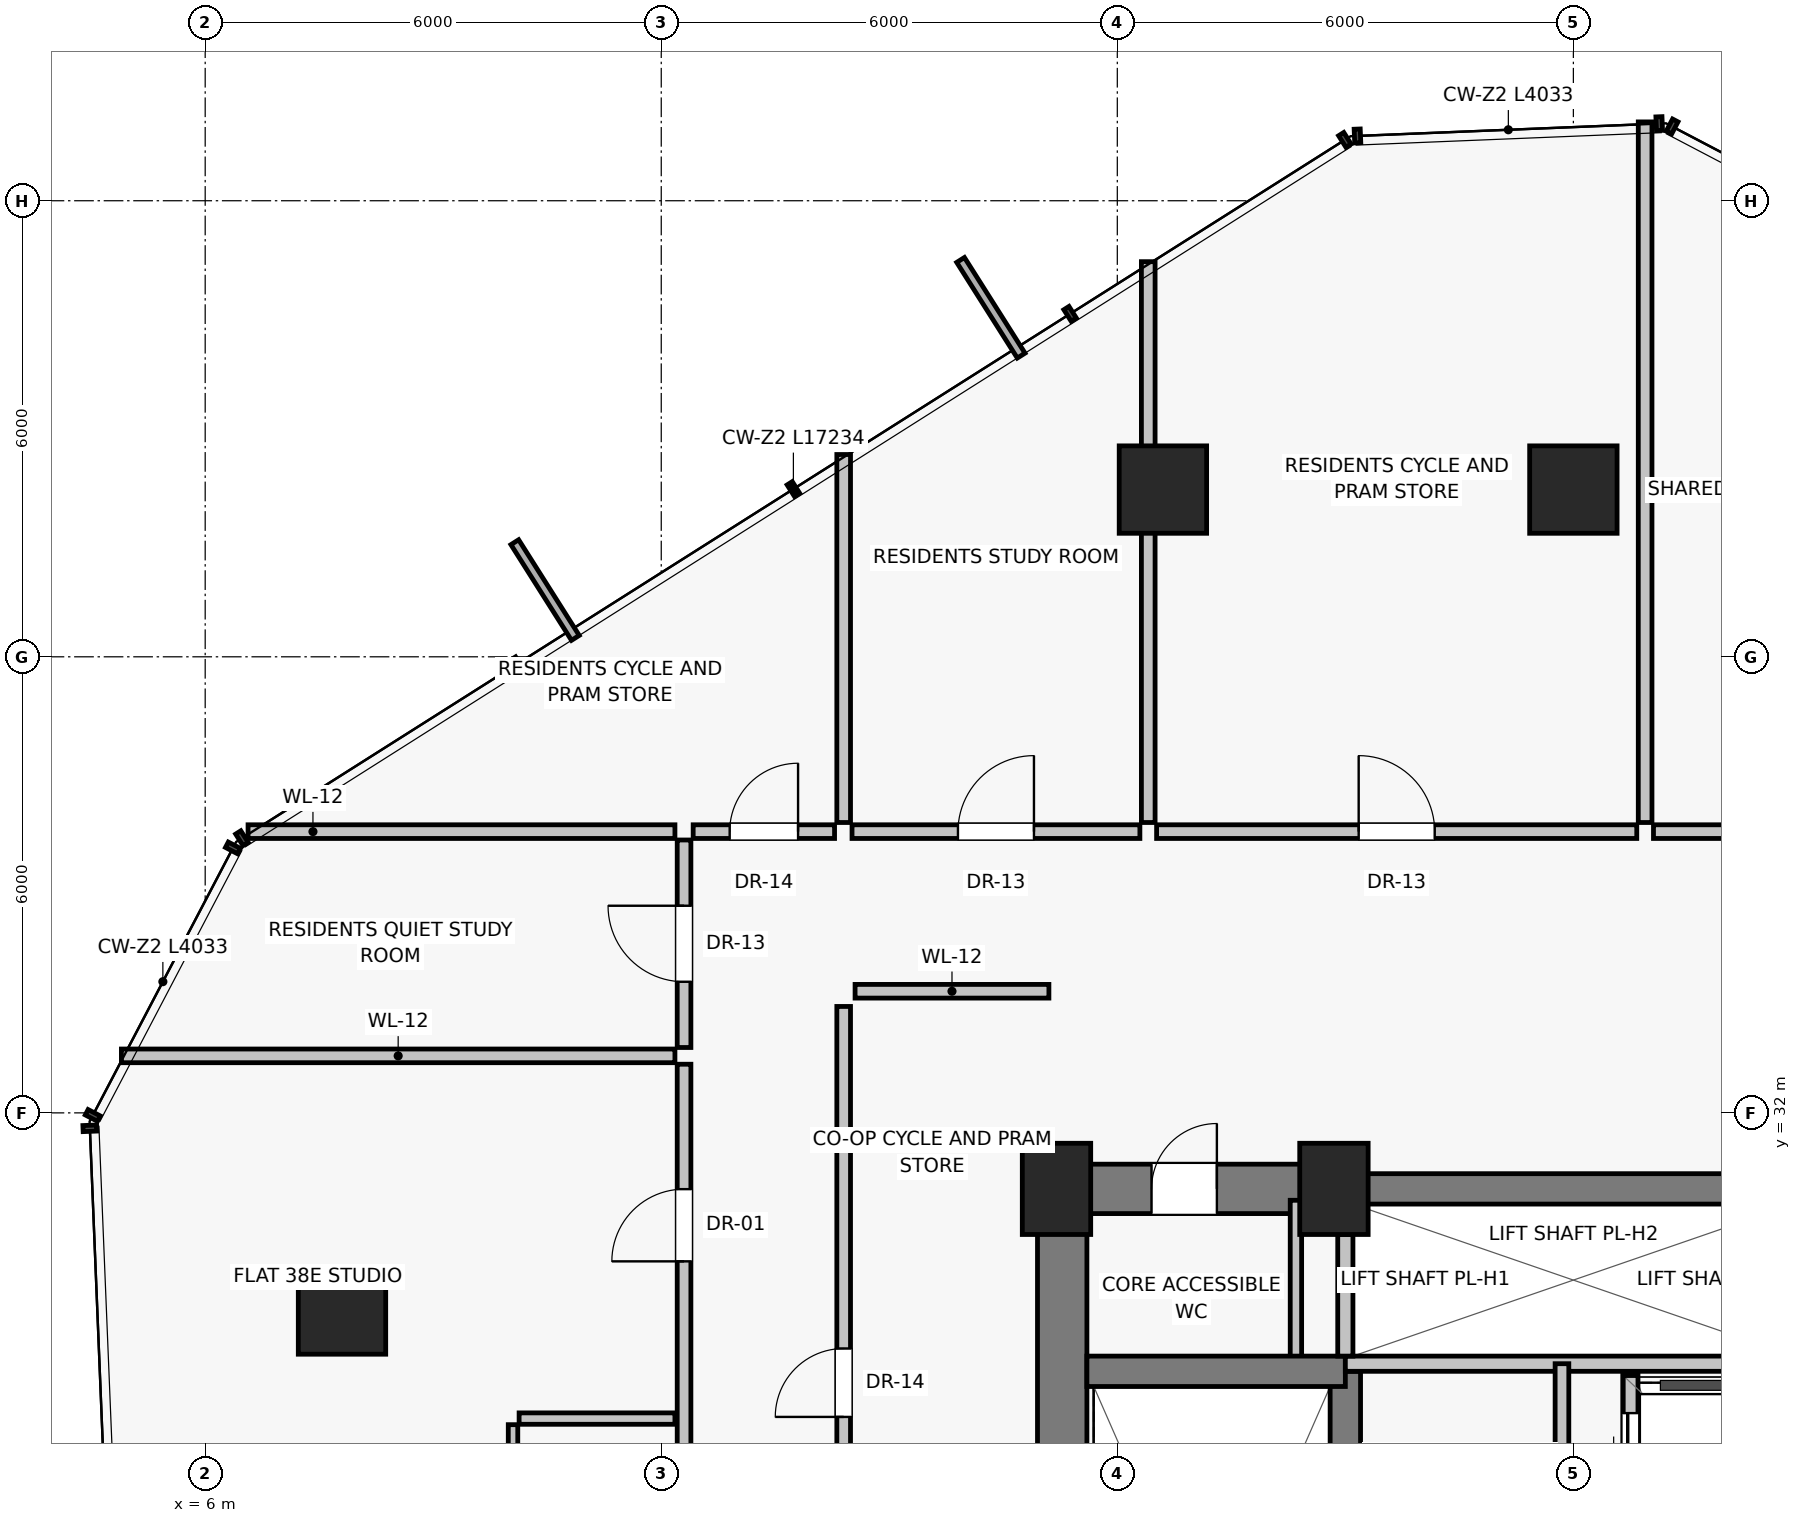
"""IFC4 building model, lengths in metres.
Left out: names, types, materials, properties, quantities, classifications, styles, units other than length and angle.
Written with IfcOpenShell. Run it as: python <this file> out.ifc"""

import sys

from ifc_helpers import new_model, si_unit, direction, frame, frame_2d, origin, origin_2d, place, context, subcontext, project, spatial, rectangle, extrude, source, transform, mapped, element, fill, save


model = new_model("IFC4")
c1 = context("Model", 3, precision=1e-05, world=origin(), true_north=direction((0.0, 1.0)))
c2 = subcontext(c1, "Body", "Model", "MODEL_VIEW")
j1 = project(units=[si_unit("LENGTHUNIT", "METRE"), si_unit("PLANEANGLEUNIT", "RADIAN")], contexts=[c1])
p1 = place(None, origin())
s1 = spatial("IfcSite", under=j1, at=p1, CompositionType="ELEMENT")
p2 = place(p1, origin())
s2 = spatial("IfcBuilding", under=s1, at=p2, CompositionType="ELEMENT")
p3 = place(p2, frame((0.0, 0.0, 136.0)))
s3 = spatial("IfcBuildingStorey", under=s2, at=p3, CompositionType="ELEMENT", Elevation=136.0)
for number, where, z_axis, x_axis in (
    (1, (17.2, 31.0, 0.0), (0.0, 0.0, 1.0), (1.0, 0.0, 0.0)),
    (2, (20.85, 31.0, 0.0), (0.0, 0.0, 1.0), (1.0, 0.0, 0.0)),
):
    element("IfcColumn", number, at=place(p3, frame(where, z_axis=z_axis, x_axis=x_axis)), inside=s3, PredefinedType="PILASTER", context=c2, shape_type="SweptSolid", body=[
        extrude(rectangle(XDim=0.9, YDim=1.2, at=origin_2d()), origin(), (0.0, 0.0, 1.0), 3.25),
    ])
for number, where, z_axis, x_axis in (
    (3, (24.0, 40.2, 0.0), (0.0, 0.0, 1.0), (1.0, 0.0, 0.0)),
    (4, (18.6, 40.2, 0.0), (0.0, 0.0, 1.0), (1.0, 0.0, 0.0)),
    (5, (7.8, 29.4, 0.0), (0.0, 0.0, 1.0), (1.0, 0.0, 0.0)),
):
    element("IfcColumn", number, at=place(p3, frame(where, z_axis=z_axis, x_axis=x_axis)), inside=s3, PredefinedType="COLUMN", context=c2, shape_type="SweptSolid", body=[
        extrude(rectangle(XDim=1.15, YDim=1.15, at=origin_2d()), origin(), (0.0, 0.0, 1.0), 3.25),
    ])
p4 = place(p3, frame((17.275, 16.8, 0.0), z_axis=(0.0, 0.0, 1.0), x_axis=(0.0, 1.0, 0.0)))
e6 = element("IfcWall", 6, at=p4, inside=s3, PredefinedType="SHEAR", context=c2, shape_type="SweptSolid", body=[
    extrude(rectangle(XDim=14.2, YDim=0.65, at=frame_2d((7.1, 0.0))), origin(), (0.0, 0.0, 1.0), 3.0),
])
p5 = place(p3, frame((17.2, 31.0, 0.0), z_axis=(0.0, 0.0, 1.0), x_axis=(1.0, 0.0, 0.0)))
e7 = element("IfcWall", 7, at=p5, inside=s3, PredefinedType="SHEAR", context=c2, shape_type="SweptSolid", body=[
    extrude(rectangle(XDim=3.8, YDim=0.65, at=frame_2d((1.9, 0.0))), origin(), (0.0, 0.0, 1.0), 3.0),
])
p6 = place(p5, frame((1.25, 0.0, 0.0)))
e8 = element("IfcOpeningElement", 8, at=p6, cuts=e7, PredefinedType="OPENING", context=c2, shape_type="SweptSolid", body=[
    extrude(rectangle(XDim=0.86, YDim=2.01, at=frame_2d((0.43, 1.005))), frame((0.0, 0.335, 0.0), z_axis=(0.0, -1.0, 0.0), x_axis=(1.0, 0.0, 0.0)), (0.0, 0.0, 1.0), 0.67),
])
p7 = place(p3, frame((21.0, 31.0, 0.0), z_axis=(0.0, 0.0, 1.0), x_axis=(1.0, 0.0, 0.0)))
e9 = element("IfcWall", 9, at=p7, inside=s3, PredefinedType="SHEAR", context=c2, shape_type="SweptSolid", body=[
    extrude(rectangle(XDim=6.0, YDim=0.4, at=frame_2d((3.0, 0.0))), origin(), (0.0, 0.0, 1.0), 3.0),
])
p8 = place(p3, frame((20.35, 28.65, 0.0), z_axis=(0.0, 0.0, 1.0), x_axis=(0.0, 1.0, 0.0)))
e10 = element("IfcWall", 10, at=p8, inside=s3, PredefinedType="PARTITIONING", context=c2, shape_type="SweptSolid", body=[
    extrude(rectangle(XDim=2.2, YDim=0.15, at=frame_2d((1.1, 0.0))), origin(), (0.0, 0.0, 1.0), 3.0),
])
p9 = place(p3, frame((21.0, 19.8, 0.0), z_axis=(0.0, 0.0, 1.0), x_axis=(0.0, 1.0, 0.0)))
e11 = element("IfcWall", 11, at=p9, inside=s3, PredefinedType="SHEAR", context=c2, shape_type="SweptSolid", body=[
    extrude(rectangle(XDim=8.8, YDim=0.4, at=frame_2d((4.4, 0.0))), origin(), (0.0, 0.0, 1.0), 3.0),
])
p10 = place(p3, frame((17.6, 28.6, 0.0), z_axis=(0.0, 0.0, 1.0), x_axis=(1.0, 0.0, 0.0)))
e12 = element("IfcWall", 12, at=p10, inside=s3, PredefinedType="SHEAR", context=c2, shape_type="SweptSolid", body=[
    extrude(rectangle(XDim=3.4, YDim=0.4, at=frame_2d((1.7, 0.0))), origin(), (0.0, 0.0, 1.0), 3.0),
])
p11 = place(p3, frame((21.0, 28.7, 0.0), z_axis=(0.0, 0.0, 1.0), x_axis=(1.0, 0.0, 0.0)))
e13 = element("IfcWall", 13, at=p11, inside=s3, PredefinedType="SOLIDWALL", context=c2, shape_type="SweptSolid", body=[
    extrude(rectangle(XDim=6.0, YDim=0.2, at=frame_2d((3.0, 0.0))), origin(), (0.0, 0.0, 1.0), 3.0),
])
p12 = place(p3, frame((21.0, 28.8, 0.0), z_axis=(0.0, 0.0, 1.0), x_axis=(0.0, 1.0, 0.0)))
e14 = element("IfcWall", 14, at=p12, inside=s3, PredefinedType="SOLIDWALL", context=c2, shape_type="SweptSolid", body=[
    extrude(rectangle(XDim=1.6, YDim=0.2, at=frame_2d((0.8, 0.0))), origin(), (0.0, 0.0, 1.0), 3.0),
])
p13 = place(p3, frame((23.85, 22.6, 0.0), z_axis=(0.0, 0.0, 1.0), x_axis=(0.0, 1.0, 0.0)))
e15 = element("IfcWall", 15, at=p13, inside=s3, PredefinedType="PARTITIONING", context=c2, shape_type="SweptSolid", body=[
    extrude(rectangle(XDim=6.1, YDim=0.18, at=frame_2d((3.05, 0.0))), origin(), (0.0, 0.0, 1.0), 3.0),
])
p14 = place(p13, frame((2.4, 0.0, 0.0)))
e16 = element("IfcOpeningElement", 16, at=p14, cuts=e15, PredefinedType="OPENING", context=c2, shape_type="SweptSolid", body=[
    extrude(rectangle(XDim=0.9, YDim=2.01, at=frame_2d((0.45, 1.005))), frame((0.0, 0.1, 0.0), z_axis=(0.0, -1.0, 0.0), x_axis=(1.0, 0.0, 0.0)), (0.0, 0.0, 1.0), 0.2),
])
p15 = place(p3, frame((24.75, 22.6, 0.0), z_axis=(0.0, 0.0, 1.0), x_axis=(0.0, 1.0, 0.0)))
e17 = element("IfcWall", 17, at=p15, inside=s3, PredefinedType="SOLIDWALL", context=c2, shape_type="SweptSolid", body=[
    extrude(rectangle(XDim=5.95, YDim=0.2, at=frame_2d((2.975, 0.0))), origin(), (0.0, 0.0, 1.0), 3.0),
])
p16 = place(p15, frame((0.45, 0.0, 0.0)))
e18 = element("IfcOpeningElement", 18, at=p16, cuts=e17, PredefinedType="OPENING", context=c2, shape_type="SweptSolid", body=[
    extrude(rectangle(XDim=1.1, YDim=2.08, at=frame_2d((0.55, 1.04))), frame((0.0, 0.11, 0.0), z_axis=(0.0, -1.0, 0.0), x_axis=(1.0, 0.0, 0.0)), (0.0, 0.0, 1.0), 0.22),
])
p17 = place(p15, frame((2.4, 0.0, 0.0)))
e19 = element("IfcOpeningElement", 19, at=p17, cuts=e17, PredefinedType="OPENING", context=c2, shape_type="SweptSolid", body=[
    extrude(rectangle(XDim=1.1, YDim=2.08, at=frame_2d((0.55, 1.04))), frame((0.0, 0.11, 0.0), z_axis=(0.0, -1.0, 0.0), x_axis=(1.0, 0.0, 0.0)), (0.0, 0.0, 1.0), 0.22),
])
p18 = place(p15, frame((4.35, 0.0, 0.0)))
e20 = element("IfcOpeningElement", 20, at=p18, cuts=e17, PredefinedType="OPENING", context=c2, shape_type="SweptSolid", body=[
    extrude(rectangle(XDim=1.1, YDim=2.08, at=frame_2d((0.55, 1.04))), frame((0.0, 0.11, 0.0), z_axis=(0.0, -1.0, 0.0), x_axis=(1.0, 0.0, 0.0)), (0.0, 0.0, 1.0), 0.22),
])
p19 = place(p3, frame((14.4, 24.2, 0.0), z_axis=(0.0, 0.0, 1.0), x_axis=(0.0, 1.0, 0.0)))
e21 = element("IfcWall", 21, at=p19, inside=s3, PredefinedType="PARTITIONING", context=c2, shape_type="SweptSolid", body=[
    extrude(rectangle(XDim=9.2, YDim=0.18, at=frame_2d((4.6, 0.0))), origin(), (0.0, 0.0, 1.0), 3.0),
])
p20 = place(p19, frame((3.8, 0.0, 0.0)))
e22 = element("IfcOpeningElement", 22, at=p20, cuts=e21, PredefinedType="OPENING", context=c2, shape_type="SweptSolid", body=[
    extrude(rectangle(XDim=0.9, YDim=2.01, at=frame_2d((0.45, 1.005))), frame((0.0, 0.1, 0.0), z_axis=(0.0, -1.0, 0.0), x_axis=(1.0, 0.0, 0.0)), (0.0, 0.0, 1.0), 0.2),
])
p21 = place(p3, frame((14.55, 33.6, 0.0), z_axis=(0.0, 0.0, 1.0), x_axis=(1.0, 0.0, 0.0)))
e23 = element("IfcWall", 23, at=p21, inside=s3, PredefinedType="PARTITIONING", context=c2, shape_type="SweptSolid", body=[
    extrude(rectangle(XDim=2.55, YDim=0.18, at=frame_2d((1.275, 0.0))), origin(), (0.0, 0.0, 1.0), 3.0),
])
p22 = place(p3, frame((14.4, 35.82, 0.0), z_axis=(0.0, 0.0, 1.0), x_axis=(0.0, 1.0, 0.0)))
e24 = element("IfcWall", 24, at=p22, inside=s3, PredefinedType="PARTITIONING", context=c2, shape_type="SweptSolid", body=[
    extrude(rectangle(XDim=4.841, YDim=0.18, at=frame_2d((2.421, 0.0))), origin(), (0.0, 0.0, 1.0), 3.0),
])
p23 = place(p3, frame((14.51, 35.7, 0.0), z_axis=(0.0, 0.0, 1.0), x_axis=(1.0, 0.0, 0.0)))
e25 = element("IfcWall", 25, at=p23, inside=s3, PredefinedType="PARTITIONING", context=c2, shape_type="SweptSolid", body=[
    extrude(rectangle(XDim=3.787, YDim=0.18, at=frame_2d((1.894, 0.0))), origin(), (0.0, 0.0, 1.0), 2.58),
])
p24 = place(p23, frame((1.394, 0.0, 0.0)))
e26 = element("IfcOpeningElement", 26, at=p24, cuts=e25, PredefinedType="OPENING", context=c2, shape_type="SweptSolid", body=[
    extrude(rectangle(XDim=1.0, YDim=2.01, at=frame_2d((0.5, 1.005))), frame((0.0, 0.1, 0.0), z_axis=(0.0, -1.0, 0.0), x_axis=(1.0, 0.0, 0.0)), (0.0, 0.0, 1.0), 0.2),
])
p25 = place(p3, frame((18.517, 35.7, 0.0), z_axis=(0.0, 0.0, 1.0), x_axis=(1.0, 0.0, 0.0)))
e27 = element("IfcWall", 27, at=p25, inside=s3, PredefinedType="PARTITIONING", context=c2, shape_type="SweptSolid", body=[
    extrude(rectangle(XDim=6.317, YDim=0.18, at=frame_2d((3.158, 0.0))), origin(), (0.0, 0.0, 1.0), 2.58),
])
p26 = place(p25, frame((2.658, 0.0, 0.0)))
e28 = element("IfcOpeningElement", 28, at=p26, cuts=e27, PredefinedType="OPENING", context=c2, shape_type="SweptSolid", body=[
    extrude(rectangle(XDim=1.0, YDim=2.01, at=frame_2d((0.5, 1.005))), frame((0.0, 0.1, 0.0), z_axis=(0.0, -1.0, 0.0), x_axis=(1.0, 0.0, 0.0)), (0.0, 0.0, 1.0), 0.2),
])
p27 = place(p3, frame((18.407, 35.82, 0.0), z_axis=(0.0, 0.0, 1.0), x_axis=(0.0, 1.0, 0.0)))
e29 = element("IfcWall", 29, at=p27, inside=s3, PredefinedType="PARTITIONING", context=c2, shape_type="SweptSolid", body=[
    extrude(rectangle(XDim=7.378, YDim=0.18, at=frame_2d((3.689, 0.0))), origin(), (0.0, 0.0, 1.0), 2.378),
])
p28 = place(p3, frame((24.944, 35.82, 0.0), z_axis=(0.0, 0.0, 1.0), x_axis=(0.0, 1.0, 0.0)))
e30 = element("IfcWall", 30, at=p28, inside=s3, PredefinedType="PARTITIONING", context=c2, shape_type="SweptSolid", body=[
    extrude(rectangle(XDim=9.217, YDim=0.18, at=frame_2d((4.608, 0.0))), origin(), (0.0, 0.0, 1.0), 3.0),
])
p29 = place(p3, frame((25.054, 35.7, 0.0), z_axis=(0.0, 0.0, 1.0), x_axis=(1.0, 0.0, 0.0)))
e31 = element("IfcWall", 31, at=p29, inside=s3, PredefinedType="PARTITIONING", context=c2, shape_type="SweptSolid", body=[
    extrude(rectangle(XDim=3.069, YDim=0.18, at=frame_2d((1.535, 0.0))), origin(), (0.0, 0.0, 1.0), 2.58),
])
p30 = place(p29, frame((1.034, 0.0, 0.0)))
e32 = element("IfcOpeningElement", 32, at=p30, cuts=e31, PredefinedType="OPENING", context=c2, shape_type="SweptSolid", body=[
    extrude(rectangle(XDim=1.0, YDim=2.01, at=frame_2d((0.5, 1.005))), frame((0.0, 0.1, 0.0), z_axis=(0.0, -1.0, 0.0), x_axis=(1.0, 0.0, 0.0)), (0.0, 0.0, 1.0), 0.2),
])
p31 = place(p3, frame((12.18, 35.7, 0.0), z_axis=(0.0, 0.0, 1.0), x_axis=(-1.0, 0.0, 0.0)))
e33 = element("IfcWall", 33, at=p31, inside=s3, PredefinedType="PARTITIONING", context=c2, shape_type="SweptSolid", body=[
    extrude(rectangle(XDim=5.616, YDim=0.18, at=frame_2d((2.808, 0.0))), origin(), (0.0, 0.0, 1.0), 3.0),
])
p32 = place(p3, frame((12.3, 32.86, 0.0), z_axis=(0.0, 0.0, 1.0), x_axis=(0.0, 1.0, 0.0)))
e34 = element("IfcWall", 34, at=p32, inside=s3, PredefinedType="PARTITIONING", context=c2, shape_type="SweptSolid", body=[
    extrude(rectangle(XDim=2.73, YDim=0.18, at=frame_2d((1.365, 0.0))), origin(), (0.0, 0.0, 1.0), 3.0),
])
p33 = place(p32, frame((0.865, 0.0, 0.0)))
e35 = element("IfcOpeningElement", 35, at=p33, cuts=e34, PredefinedType="OPENING", context=c2, shape_type="SweptSolid", body=[
    extrude(rectangle(XDim=1.0, YDim=2.01, at=frame_2d((0.5, 1.005))), frame((0.0, 0.1, 0.0), z_axis=(0.0, -1.0, 0.0), x_axis=(1.0, 0.0, 0.0)), (0.0, 0.0, 1.0), 0.2),
])
p34 = place(p3, frame((12.18, 32.75, 0.0), z_axis=(0.0, 0.0, 1.0), x_axis=(-1.0, 0.0, 0.0)))
e36 = element("IfcWall", 36, at=p34, inside=s3, PredefinedType="PARTITIONING", context=c2, shape_type="SweptSolid", body=[
    extrude(rectangle(XDim=7.282, YDim=0.18, at=frame_2d((3.641, 0.0))), origin(), (0.0, 0.0, 1.0), 3.0),
])
p35 = place(p3, frame((12.3, 25.738, 0.0), z_axis=(0.0, 0.0, 1.0), x_axis=(0.0, 1.0, 0.0)))
e37 = element("IfcWall", 37, at=p35, inside=s3, PredefinedType="PARTITIONING", context=c2, shape_type="SweptSolid", body=[
    extrude(rectangle(XDim=6.902, YDim=0.18, at=frame_2d((3.451, 0.0))), origin(), (0.0, 0.0, 1.0), 2.58),
])
p36 = place(p35, frame((4.309, 0.0, 0.0)))
e38 = element("IfcOpeningElement", 38, at=p36, cuts=e37, PredefinedType="OPENING", context=c2, shape_type="SweptSolid", body=[
    extrude(rectangle(XDim=0.95, YDim=2.02, at=frame_2d((0.475, 1.01))), frame((0.0, 0.1, 0.0), z_axis=(0.0, -1.0, 0.0), x_axis=(1.0, 0.0, 0.0)), (0.0, 0.0, 1.0), 0.2),
])
p37 = place(p3, frame((12.18, 27.978, 0.0), z_axis=(0.0, 0.0, 1.0), x_axis=(-1.0, 0.0, 0.0)))
e39 = element("IfcWall", 39, at=p37, inside=s3, PredefinedType="PARTITIONING", context=c2, shape_type="SweptSolid", body=[
    extrude(rectangle(XDim=2.05, YDim=0.15, at=frame_2d((1.025, 0.0))), origin(), (0.0, 0.0, 1.0), 3.0),
])
p38 = place(p3, frame((10.05, 25.748, 0.0), z_axis=(0.0, 0.0, 1.0), x_axis=(0.0, 1.0, 0.0)))
e40 = element("IfcWall", 40, at=p38, inside=s3, PredefinedType="PARTITIONING", context=c2, shape_type="SweptSolid", body=[
    extrude(rectangle(XDim=2.15, YDim=0.125, at=frame_2d((1.075, 0.0))), origin(), (0.0, 0.0, 1.0), 3.0),
])
p39 = place(p38, frame((0.645, 0.0, 0.0)))
e41 = element("IfcOpeningElement", 41, at=p39, cuts=e40, PredefinedType="OPENING", context=c2, shape_type="SweptSolid", body=[
    extrude(rectangle(XDim=0.86, YDim=2.01, at=frame_2d((0.43, 1.005))), frame((0.0, 0.073, 0.0), z_axis=(0.0, -1.0, 0.0), x_axis=(1.0, 0.0, 0.0)), (0.0, 0.0, 1.0), 0.145),
])
p40 = place(p3, frame((12.42, 35.7, 0.0), z_axis=(0.0, 0.0, 1.0), x_axis=(1.0, 0.0, 0.0)))
e42 = element("IfcWall", 42, at=p40, inside=s3, PredefinedType="PARTITIONING", context=c2, shape_type="SweptSolid", body=[
    extrude(rectangle(XDim=1.86, YDim=0.18, at=frame_2d((0.93, 0.0))), origin(), (0.0, 0.0, 1.0), 3.0),
])
p41 = place(p40, frame((0.48, 0.0, 0.0)))
e43 = element("IfcOpeningElement", 43, at=p41, cuts=e42, PredefinedType="OPENING", context=c2, shape_type="SweptSolid", body=[
    extrude(rectangle(XDim=0.9, YDim=2.01, at=frame_2d((0.45, 1.005))), frame((0.0, 0.1, 0.0), z_axis=(0.0, -1.0, 0.0), x_axis=(1.0, 0.0, 0.0)), (0.0, 0.0, 1.0), 0.2),
])
m1 = source(origin(), c2, "Body", "SweptSolid", [
    extrude(rectangle(XDim=0.86, YDim=2.01, at=frame_2d((0.43, 1.005))), frame((0.0, 0.025, 0.0), z_axis=(0.0, -1.0, 0.0), x_axis=(1.0, 0.0, 0.0)), (0.0, 0.0, 1.0), 0.05),
])
p42 = place(p6, origin())
e44 = element("IfcDoor", 44, at=p42, inside=s3, OperationType="SINGLE_SWING_RIGHT", PredefinedType="DOOR", context=c2, shape_type="MappedRepresentation", body=[
    mapped(m1, transform((0.0, 0.0, 0.0), scale=1.0)),
])
fill(e8, e44)
m2 = source(origin(), c2, "Body", "SweptSolid", [
    extrude(rectangle(XDim=1.1, YDim=2.08, at=frame_2d((0.55, 1.04))), frame((0.0, 0.025, 0.0), z_axis=(0.0, -1.0, 0.0), x_axis=(1.0, 0.0, 0.0)), (0.0, 0.0, 1.0), 0.05),
])
p43 = place(p18, origin())
e45 = element("IfcDoor", 45, at=p43, inside=s3, OperationType="SLIDING_TO_LEFT", PredefinedType="DOOR", context=c2, shape_type="MappedRepresentation", body=[
    mapped(m2, transform((0.0, 0.0, 0.0), scale=1.0)),
])
fill(e20, e45)
m3 = source(origin(), c2, "Body", "SweptSolid", [
    extrude(rectangle(XDim=0.9, YDim=2.01, at=frame_2d((0.45, 1.005))), frame((0.0, 0.025, 0.0), z_axis=(0.0, -1.0, 0.0), x_axis=(1.0, 0.0, 0.0)), (0.0, 0.0, 1.0), 0.05),
])
p44 = place(p20, origin())
e46 = element("IfcDoor", 46, at=p44, inside=s3, OperationType="SINGLE_SWING_LEFT", PredefinedType="DOOR", context=c2, shape_type="MappedRepresentation", body=[
    mapped(m3, transform((0.0, 0.0, 0.0), scale=1.0)),
])
fill(e22, e46)
m4 = source(origin(), c2, "Body", "SweptSolid", [
    extrude(rectangle(XDim=1.0, YDim=2.01, at=frame_2d((0.5, 1.005))), frame((0.0, 0.025, 0.0), z_axis=(0.0, -1.0, 0.0), x_axis=(1.0, 0.0, 0.0)), (0.0, 0.0, 1.0), 0.05),
])
p45 = place(p24, origin())
e47 = element("IfcDoor", 47, at=p45, inside=s3, OperationType="SINGLE_SWING_RIGHT", PredefinedType="DOOR", context=c2, shape_type="MappedRepresentation", body=[
    mapped(m4, transform((0.0, 0.0, 0.0), scale=1.0)),
])
fill(e26, e47)
p46 = place(p26, origin())
e48 = element("IfcDoor", 48, at=p46, inside=s3, OperationType="SINGLE_SWING_LEFT", PredefinedType="DOOR", context=c2, shape_type="MappedRepresentation", body=[
    mapped(m4, transform((0.0, 0.0, 0.0), scale=1.0)),
])
fill(e28, e48)
p47 = place(p33, origin())
e49 = element("IfcDoor", 49, at=p47, inside=s3, OperationType="SINGLE_SWING_RIGHT", PredefinedType="DOOR", context=c2, shape_type="MappedRepresentation", body=[
    mapped(m4, transform((0.0, 0.0, 0.0), scale=1.0)),
])
fill(e35, e49)
m5 = source(origin(), c2, "Body", "SweptSolid", [
    extrude(rectangle(XDim=0.95, YDim=2.02, at=frame_2d((0.475, 1.01))), frame((0.0, 0.025, 0.0), z_axis=(0.0, -1.0, 0.0), x_axis=(1.0, 0.0, 0.0)), (0.0, 0.0, 1.0), 0.05),
])
p48 = place(p36, origin())
e50 = element("IfcDoor", 50, at=p48, inside=s3, OperationType="SINGLE_SWING_LEFT", PredefinedType="DOOR", context=c2, shape_type="MappedRepresentation", body=[
    mapped(m5, transform((0.0, 0.0, 0.0), scale=1.0)),
])
fill(e38, e50)
p49 = place(p41, origin())
e51 = element("IfcDoor", 51, at=p49, inside=s3, OperationType="SINGLE_SWING_RIGHT", PredefinedType="DOOR", context=c2, shape_type="MappedRepresentation", body=[
    mapped(m3, transform((0.0, 0.0, 0.0), scale=1.0)),
])
fill(e43, e51)
save(model, sys.argv[1])
